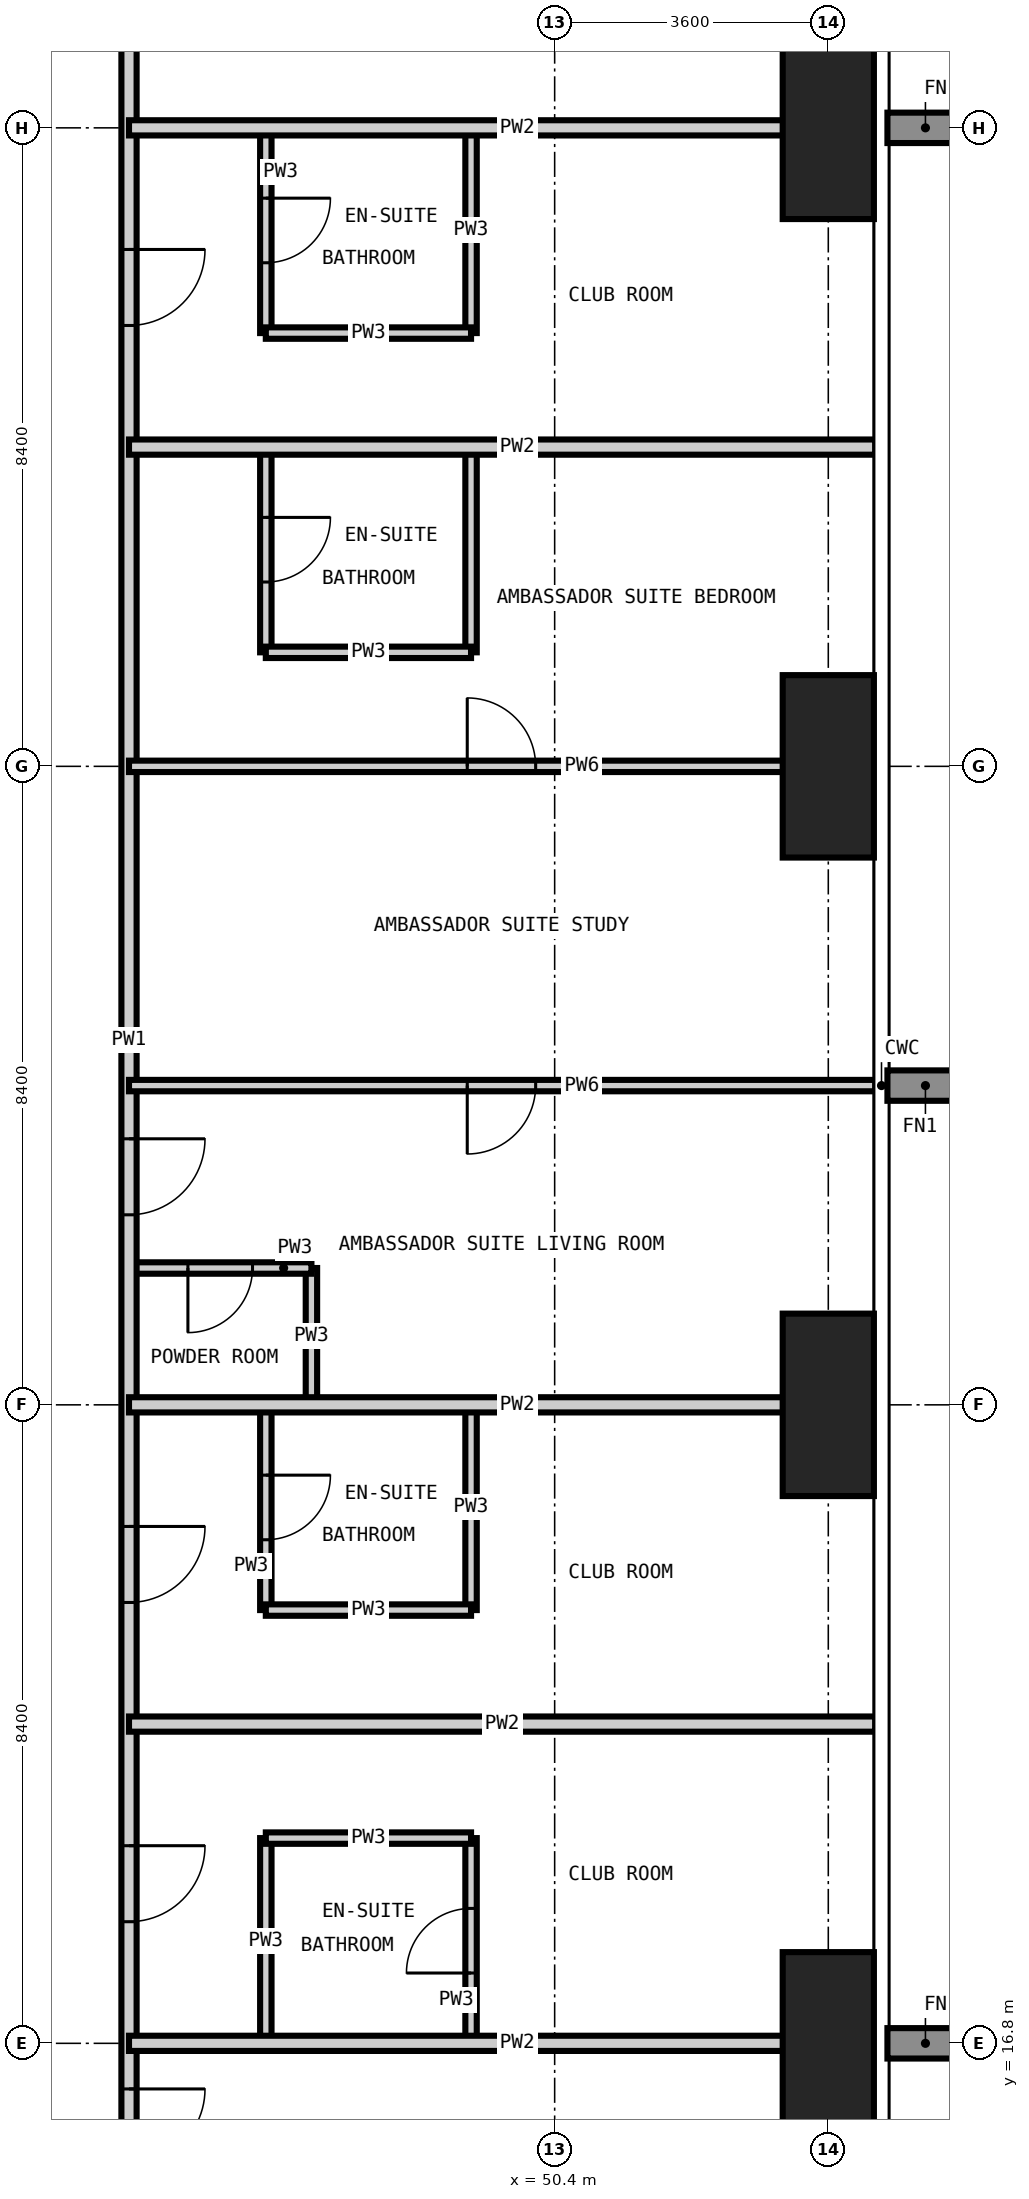
"""IFC4 building model, lengths in metres.
Left out: names, types, materials, properties, quantities, classifications, styles, units other than length and angle.
Written with IfcOpenShell. Run it as: python <this file> out.ifc"""

import sys

from ifc_helpers import new_model, si_unit, direction, frame, frame_2d, origin, origin_2d, place, context, subcontext, project, spatial, rectangle, extrude, element, fill, save


model = new_model("IFC4")
c1 = context("Model", 3, precision=1e-05, world=origin(), true_north=direction((0.0, 1.0)))
c2 = subcontext(c1, "Body", "Model", "MODEL_VIEW")
j1 = project(units=[si_unit("LENGTHUNIT", "METRE"), si_unit("PLANEANGLEUNIT", "RADIAN")], contexts=[c1])
p1 = place(None, origin())
s1 = spatial("IfcSite", under=j1, at=p1, CompositionType="ELEMENT")
p2 = place(p1, origin())
s2 = spatial("IfcBuilding", under=s1, at=p2, CompositionType="ELEMENT")
p3 = place(p2, frame((0.0, 0.0, 205.8)))
s3 = spatial("IfcBuildingStorey", under=s2, at=p3, CompositionType="ELEMENT", Elevation=205.8)
for number, where, z_axis, x_axis in (
    (1, (54.0, 16.8, -0.35), (0.0, 0.0, 1.0), (1.0, 0.0, 0.0)),
    (2, (54.0, 25.2, -0.35), (0.0, 0.0, 1.0), (1.0, 0.0, 0.0)),
    (3, (54.0, 33.6, -0.35), (0.0, 0.0, 1.0), (1.0, 0.0, 0.0)),
    (4, (54.0, 42.0, -0.35), (0.0, 0.0, 1.0), (1.0, 0.0, 0.0)),
):
    element("IfcColumn", number, at=place(p3, frame(where, z_axis=z_axis, x_axis=x_axis)), inside=s3, PredefinedType="COLUMN", context=c2, shape_type="SweptSolid", body=[
        extrude(rectangle(XDim=1.2, YDim=2.4, at=origin_2d()), origin(), (0.0, 0.0, 1.0), 3.6),
    ])
p4 = place(p3, frame((46.6, 16.8, 0.0), z_axis=(0.0, 0.0, 1.0), x_axis=(0.0, 1.0, 0.0)))
e5 = element("IfcWall", 5, at=p4, inside=s3, PredefinedType="PARTITIONING", context=c2, shape_type="SweptSolid", body=[
    extrude(rectangle(XDim=2.7, YDim=0.15, at=frame_2d((1.35, 0.0))), origin(), (0.0, 0.0, 1.0), 3.25),
])
p5 = place(p3, frame((46.6, 22.5, 0.0), z_axis=(0.0, 0.0, 1.0), x_axis=(0.0, 1.0, 0.0)))
e6 = element("IfcWall", 6, at=p5, inside=s3, PredefinedType="PARTITIONING", context=c2, shape_type="SweptSolid", body=[
    extrude(rectangle(XDim=2.7, YDim=0.15, at=frame_2d((1.35, 0.0))), origin(), (0.0, 0.0, 1.0), 3.25),
])
p6 = place(p5, frame((0.925, 0.0, 0.0)))
e7 = element("IfcOpeningElement", 7, at=p6, cuts=e6, PredefinedType="OPENING", context=c2, shape_type="SweptSolid", body=[
    extrude(rectangle(XDim=0.85, YDim=2.1, at=frame_2d((0.425, 1.05))), frame((0.0, 0.085, 0.0), z_axis=(0.0, -1.0, 0.0), x_axis=(1.0, 0.0, 0.0)), (0.0, 0.0, 1.0), 0.17),
])
p7 = place(p3, frame((46.6, 35.1, 0.0), z_axis=(0.0, 0.0, 1.0), x_axis=(0.0, 1.0, 0.0)))
e8 = element("IfcWall", 8, at=p7, inside=s3, PredefinedType="PARTITIONING", context=c2, shape_type="SweptSolid", body=[
    extrude(rectangle(XDim=2.7, YDim=0.15, at=frame_2d((1.35, 0.0))), origin(), (0.0, 0.0, 1.0), 3.25),
])
p8 = place(p7, frame((0.925, 0.0, 0.0)))
e9 = element("IfcOpeningElement", 9, at=p8, cuts=e8, PredefinedType="OPENING", context=c2, shape_type="SweptSolid", body=[
    extrude(rectangle(XDim=0.85, YDim=2.1, at=frame_2d((0.425, 1.05))), frame((0.0, 0.085, 0.0), z_axis=(0.0, -1.0, 0.0), x_axis=(1.0, 0.0, 0.0)), (0.0, 0.0, 1.0), 0.17),
])
p9 = place(p3, frame((46.6, 39.3, 0.0), z_axis=(0.0, 0.0, 1.0), x_axis=(0.0, 1.0, 0.0)))
e10 = element("IfcWall", 10, at=p9, inside=s3, PredefinedType="PARTITIONING", context=c2, shape_type="SweptSolid", body=[
    extrude(rectangle(XDim=2.7, YDim=0.15, at=frame_2d((1.35, 0.0))), origin(), (0.0, 0.0, 1.0), 3.25),
])
p10 = place(p9, frame((0.925, 0.0, 0.0)))
e11 = element("IfcOpeningElement", 11, at=p10, cuts=e10, PredefinedType="OPENING", context=c2, shape_type="SweptSolid", body=[
    extrude(rectangle(XDim=0.85, YDim=2.1, at=frame_2d((0.425, 1.05))), frame((0.0, 0.085, 0.0), z_axis=(0.0, -1.0, 0.0), x_axis=(1.0, 0.0, 0.0)), (0.0, 0.0, 1.0), 0.17),
])
p11 = place(p3, frame((47.2, 25.2, 0.0), z_axis=(0.0, 0.0, 1.0), x_axis=(0.0, 1.0, 0.0)))
e12 = element("IfcWall", 12, at=p11, inside=s3, PredefinedType="PARTITIONING", context=c2, shape_type="SweptSolid", body=[
    extrude(rectangle(XDim=1.8, YDim=0.15, at=frame_2d((0.9, 0.0))), origin(), (0.0, 0.0, 1.0), 3.25),
])
p12 = place(p3, frame((49.3, 16.8, 0.0), z_axis=(0.0, 0.0, 1.0), x_axis=(0.0, 1.0, 0.0)))
e13 = element("IfcWall", 13, at=p12, inside=s3, PredefinedType="PARTITIONING", context=c2, shape_type="SweptSolid", body=[
    extrude(rectangle(XDim=2.7, YDim=0.15, at=frame_2d((1.35, 0.0))), origin(), (0.0, 0.0, 1.0), 3.25),
])
p13 = place(p12, frame((0.925, 0.0, 0.0)))
e14 = element("IfcOpeningElement", 14, at=p13, cuts=e13, PredefinedType="OPENING", context=c2, shape_type="SweptSolid", body=[
    extrude(rectangle(XDim=0.85, YDim=2.1, at=frame_2d((0.425, 1.05))), frame((0.0, 0.085, 0.0), z_axis=(0.0, -1.0, 0.0), x_axis=(1.0, 0.0, 0.0)), (0.0, 0.0, 1.0), 0.17),
])
for number, where, z_axis, x_axis in (
    (15, (49.3, 22.5, 0.0), (0.0, 0.0, 1.0), (0.0, 1.0, 0.0)),
    (16, (49.3, 35.1, 0.0), (0.0, 0.0, 1.0), (0.0, 1.0, 0.0)),
    (17, (49.3, 39.3, 0.0), (0.0, 0.0, 1.0), (0.0, 1.0, 0.0)),
    (18, (46.6, 19.5, 0.0), (0.0, 0.0, 1.0), (1.0, 0.0, 0.0)),
    (19, (46.6, 22.5, 0.0), (0.0, 0.0, 1.0), (1.0, 0.0, 0.0)),
):
    element("IfcWall", number, at=place(p3, frame(where, z_axis=z_axis, x_axis=x_axis)), inside=s3, PredefinedType="PARTITIONING", context=c2, shape_type="SweptSolid", body=[
        extrude(rectangle(XDim=2.7, YDim=0.15, at=frame_2d((1.35, 0.0))), origin(), (0.0, 0.0, 1.0), 3.25),
    ])
p14 = place(p3, frame((44.8, 27.0, 0.0), z_axis=(0.0, 0.0, 1.0), x_axis=(1.0, 0.0, 0.0)))
e20 = element("IfcWall", 20, at=p14, inside=s3, PredefinedType="PARTITIONING", context=c2, shape_type="SweptSolid", body=[
    extrude(rectangle(XDim=2.4, YDim=0.15, at=frame_2d((1.2, 0.0))), origin(), (0.0, 0.0, 1.0), 3.25),
])
p15 = place(p14, frame((0.775, 0.0, 0.0)))
e21 = element("IfcOpeningElement", 21, at=p15, cuts=e20, PredefinedType="OPENING", context=c2, shape_type="SweptSolid", body=[
    extrude(rectangle(XDim=0.85, YDim=2.1, at=frame_2d((0.425, 1.05))), frame((0.0, 0.085, 0.0), z_axis=(0.0, -1.0, 0.0), x_axis=(1.0, 0.0, 0.0)), (0.0, 0.0, 1.0), 0.17),
])
for number, where, z_axis, x_axis in (
    (22, (46.6, 35.1, 0.0), (0.0, 0.0, 1.0), (1.0, 0.0, 0.0)),
    (23, (46.6, 39.3, 0.0), (0.0, 0.0, 1.0), (1.0, 0.0, 0.0)),
):
    element("IfcWall", number, at=place(p3, frame(where, z_axis=z_axis, x_axis=x_axis)), inside=s3, PredefinedType="PARTITIONING", context=c2, shape_type="SweptSolid", body=[
        extrude(rectangle(XDim=2.7, YDim=0.15, at=frame_2d((1.35, 0.0))), origin(), (0.0, 0.0, 1.0), 3.25),
    ])
p16 = place(p3, frame((44.8, 45.4, 0.0), z_axis=(0.0, 0.0, 1.0), x_axis=(0.0, -1.0, 0.0)))
e24 = element("IfcWall", 24, at=p16, inside=s3, PredefinedType="PARTITIONING", context=c2, shape_type="SweptSolid", body=[
    extrude(rectangle(XDim=30.8, YDim=0.2, at=frame_2d((15.4, 0.0))), origin(), (0.0, 0.0, 1.0), 3.25),
])
p17 = place(p16, frame((26.0, 0.0, 0.0)))
e25 = element("IfcOpeningElement", 25, at=p17, cuts=e24, PredefinedType="OPENING", context=c2, shape_type="SweptSolid", body=[
    extrude(rectangle(XDim=1.0, YDim=2.2, at=frame_2d((0.5, 1.1))), frame((0.0, 0.11, 0.0), z_axis=(0.0, -1.0, 0.0), x_axis=(1.0, 0.0, 0.0)), (0.0, 0.0, 1.0), 0.22),
])
p18 = place(p16, frame((21.8, 0.0, 0.0)))
e26 = element("IfcOpeningElement", 26, at=p18, cuts=e24, PredefinedType="OPENING", context=c2, shape_type="SweptSolid", body=[
    extrude(rectangle(XDim=1.0, YDim=2.2, at=frame_2d((0.5, 1.1))), frame((0.0, 0.11, 0.0), z_axis=(0.0, -1.0, 0.0), x_axis=(1.0, 0.0, 0.0)), (0.0, 0.0, 1.0), 0.22),
])
p19 = place(p16, frame((16.7, 0.0, 0.0)))
e27 = element("IfcOpeningElement", 27, at=p19, cuts=e24, PredefinedType="OPENING", context=c2, shape_type="SweptSolid", body=[
    extrude(rectangle(XDim=1.0, YDim=2.2, at=frame_2d((0.5, 1.1))), frame((0.0, 0.11, 0.0), z_axis=(0.0, -1.0, 0.0), x_axis=(1.0, 0.0, 0.0)), (0.0, 0.0, 1.0), 0.22),
])
p20 = place(p16, frame((5.0, 0.0, 0.0)))
e28 = element("IfcOpeningElement", 28, at=p20, cuts=e24, PredefinedType="OPENING", context=c2, shape_type="SweptSolid", body=[
    extrude(rectangle(XDim=1.0, YDim=2.2, at=frame_2d((0.5, 1.1))), frame((0.0, 0.11, 0.0), z_axis=(0.0, -1.0, 0.0), x_axis=(1.0, 0.0, 0.0)), (0.0, 0.0, 1.0), 0.22),
])
p21 = place(p16, frame((29.2, 0.0, 0.0)))
e29 = element("IfcOpeningElement", 29, at=p21, cuts=e24, PredefinedType="OPENING", context=c2, shape_type="SweptSolid", body=[
    extrude(rectangle(XDim=1.0, YDim=2.2, at=frame_2d((0.5, 1.1))), frame((0.0, 0.11, 0.0), z_axis=(0.0, -1.0, 0.0), x_axis=(1.0, 0.0, 0.0)), (0.0, 0.0, 1.0), 0.22),
])
p22 = place(p16, frame((1.2, 0.0, 0.0)))
e30 = element("IfcOpeningElement", 30, at=p22, cuts=e24, PredefinedType="OPENING", context=c2, shape_type="SweptSolid", body=[
    extrude(rectangle(XDim=1.0, YDim=2.2, at=frame_2d((0.5, 1.1))), frame((0.0, 0.11, 0.0), z_axis=(0.0, -1.0, 0.0), x_axis=(1.0, 0.0, 0.0)), (0.0, 0.0, 1.0), 0.22),
])
for number, where, z_axis, x_axis in (
    (31, (44.8, 16.8, 0.0), (0.0, 0.0, 1.0), (1.0, 0.0, 0.0)),
    (32, (44.8, 21.0, 0.0), (0.0, 0.0, 1.0), (1.0, 0.0, 0.0)),
    (33, (44.8, 25.2, 0.0), (0.0, 0.0, 1.0), (1.0, 0.0, 0.0)),
    (34, (44.8, 37.8, 0.0), (0.0, 0.0, 1.0), (1.0, 0.0, 0.0)),
    (35, (44.8, 42.0, 0.0), (0.0, 0.0, 1.0), (1.0, 0.0, 0.0)),
):
    element("IfcWall", number, at=place(p3, frame(where, z_axis=z_axis, x_axis=x_axis)), inside=s3, PredefinedType="PARTITIONING", context=c2, shape_type="SweptSolid", body=[
        extrude(rectangle(XDim=9.818, YDim=0.2, at=frame_2d((4.909, 0.0))), origin(), (0.0, 0.0, 1.0), 3.25),
    ])
p23 = place(p3, frame((44.8, 29.4, 0.0), z_axis=(0.0, 0.0, 1.0), x_axis=(1.0, 0.0, 0.0)))
e36 = element("IfcWall", 36, at=p23, inside=s3, PredefinedType="PARTITIONING", context=c2, shape_type="SweptSolid", body=[
    extrude(rectangle(XDim=9.818, YDim=0.15, at=frame_2d((4.909, 0.0))), origin(), (0.0, 0.0, 1.0), 3.25),
])
p24 = place(p23, frame((4.45, 0.0, 0.0)))
e37 = element("IfcOpeningElement", 37, at=p24, cuts=e36, PredefinedType="OPENING", context=c2, shape_type="SweptSolid", body=[
    extrude(rectangle(XDim=0.9, YDim=2.1, at=frame_2d((0.45, 1.05))), frame((0.0, 0.085, 0.0), z_axis=(0.0, -1.0, 0.0), x_axis=(1.0, 0.0, 0.0)), (0.0, 0.0, 1.0), 0.17),
])
p25 = place(p3, frame((44.8, 33.6, 0.0), z_axis=(0.0, 0.0, 1.0), x_axis=(1.0, 0.0, 0.0)))
e38 = element("IfcWall", 38, at=p25, inside=s3, PredefinedType="PARTITIONING", context=c2, shape_type="SweptSolid", body=[
    extrude(rectangle(XDim=9.818, YDim=0.15, at=frame_2d((4.909, 0.0))), origin(), (0.0, 0.0, 1.0), 3.25),
])
p26 = place(p25, frame((4.45, 0.0, 0.0)))
e39 = element("IfcOpeningElement", 39, at=p26, cuts=e38, PredefinedType="OPENING", context=c2, shape_type="SweptSolid", body=[
    extrude(rectangle(XDim=0.9, YDim=2.1, at=frame_2d((0.45, 1.05))), frame((0.0, 0.085, 0.0), z_axis=(0.0, -1.0, 0.0), x_axis=(1.0, 0.0, 0.0)), (0.0, 0.0, 1.0), 0.17),
])
p27 = place(p17, origin())
e40 = element("IfcDoor", 40, at=p27, inside=s3, OperationType="SINGLE_SWING_LEFT", PredefinedType="DOOR", context=c2, shape_type="SweptSolid", body=[
    extrude(rectangle(XDim=1.0, YDim=2.2, at=frame_2d((0.5, 1.1))), frame((0.0, 0.025, 0.0), z_axis=(0.0, -1.0, 0.0), x_axis=(1.0, 0.0, 0.0)), (0.0, 0.0, 1.0), 0.05),
])
fill(e25, e40)
p28 = place(p13, origin())
e41 = element("IfcDoor", 41, at=p28, inside=s3, OperationType="SINGLE_SWING_LEFT", PredefinedType="DOOR", context=c2, shape_type="SweptSolid", body=[
    extrude(rectangle(XDim=0.85, YDim=2.1, at=frame_2d((0.425, 1.05))), frame((0.0, 0.025, 0.0), z_axis=(0.0, -1.0, 0.0), x_axis=(1.0, 0.0, 0.0)), (0.0, 0.0, 1.0), 0.05),
])
fill(e14, e41)
p29 = place(p18, origin())
e42 = element("IfcDoor", 42, at=p29, inside=s3, OperationType="SINGLE_SWING_LEFT", PredefinedType="DOOR", context=c2, shape_type="SweptSolid", body=[
    extrude(rectangle(XDim=1.0, YDim=2.2, at=frame_2d((0.5, 1.1))), frame((0.0, 0.025, 0.0), z_axis=(0.0, -1.0, 0.0), x_axis=(1.0, 0.0, 0.0)), (0.0, 0.0, 1.0), 0.05),
])
fill(e26, e42)
p30 = place(p6, frame((0.85, 0.0, 0.0), z_axis=(0.0, 0.0, 1.0), x_axis=(-1.0, 0.0, 0.0)))
e43 = element("IfcDoor", 43, at=p30, inside=s3, OperationType="SINGLE_SWING_LEFT", PredefinedType="DOOR", context=c2, shape_type="SweptSolid", body=[
    extrude(rectangle(XDim=0.85, YDim=2.1, at=frame_2d((0.425, 1.05))), frame((0.0, 0.025, 0.0), z_axis=(0.0, -1.0, 0.0), x_axis=(1.0, 0.0, 0.0)), (0.0, 0.0, 1.0), 0.05),
])
fill(e7, e43)
p31 = place(p19, origin())
e44 = element("IfcDoor", 44, at=p31, inside=s3, OperationType="SINGLE_SWING_LEFT", PredefinedType="DOOR", context=c2, shape_type="SweptSolid", body=[
    extrude(rectangle(XDim=1.0, YDim=2.2, at=frame_2d((0.5, 1.1))), frame((0.0, 0.025, 0.0), z_axis=(0.0, -1.0, 0.0), x_axis=(1.0, 0.0, 0.0)), (0.0, 0.0, 1.0), 0.05),
])
fill(e27, e44)
p32 = place(p15, frame((0.85, 0.0, 0.0), z_axis=(0.0, 0.0, 1.0), x_axis=(-1.0, 0.0, 0.0)))
e45 = element("IfcDoor", 45, at=p32, inside=s3, OperationType="SINGLE_SWING_RIGHT", PredefinedType="DOOR", context=c2, shape_type="SweptSolid", body=[
    extrude(rectangle(XDim=0.85, YDim=2.1, at=frame_2d((0.425, 1.05))), frame((0.0, 0.025, 0.0), z_axis=(0.0, -1.0, 0.0), x_axis=(1.0, 0.0, 0.0)), (0.0, 0.0, 1.0), 0.05),
])
fill(e21, e45)
p33 = place(p24, frame((0.9, 0.0, 0.0), z_axis=(0.0, 0.0, 1.0), x_axis=(-1.0, 0.0, 0.0)))
e46 = element("IfcDoor", 46, at=p33, inside=s3, OperationType="SINGLE_SWING_RIGHT", PredefinedType="DOOR", context=c2, shape_type="SweptSolid", body=[
    extrude(rectangle(XDim=0.9, YDim=2.1, at=frame_2d((0.45, 1.05))), frame((0.0, 0.025, 0.0), z_axis=(0.0, -1.0, 0.0), x_axis=(1.0, 0.0, 0.0)), (0.0, 0.0, 1.0), 0.05),
])
fill(e37, e46)
p34 = place(p26, origin())
e47 = element("IfcDoor", 47, at=p34, inside=s3, OperationType="SINGLE_SWING_LEFT", PredefinedType="DOOR", context=c2, shape_type="SweptSolid", body=[
    extrude(rectangle(XDim=0.9, YDim=2.1, at=frame_2d((0.45, 1.05))), frame((0.0, 0.025, 0.0), z_axis=(0.0, -1.0, 0.0), x_axis=(1.0, 0.0, 0.0)), (0.0, 0.0, 1.0), 0.05),
])
fill(e39, e47)
p35 = place(p8, frame((0.85, 0.0, 0.0), z_axis=(0.0, 0.0, 1.0), x_axis=(-1.0, 0.0, 0.0)))
e48 = element("IfcDoor", 48, at=p35, inside=s3, OperationType="SINGLE_SWING_LEFT", PredefinedType="DOOR", context=c2, shape_type="SweptSolid", body=[
    extrude(rectangle(XDim=0.85, YDim=2.1, at=frame_2d((0.425, 1.05))), frame((0.0, 0.025, 0.0), z_axis=(0.0, -1.0, 0.0), x_axis=(1.0, 0.0, 0.0)), (0.0, 0.0, 1.0), 0.05),
])
fill(e9, e48)
p36 = place(p20, origin())
e49 = element("IfcDoor", 49, at=p36, inside=s3, OperationType="SINGLE_SWING_LEFT", PredefinedType="DOOR", context=c2, shape_type="SweptSolid", body=[
    extrude(rectangle(XDim=1.0, YDim=2.2, at=frame_2d((0.5, 1.1))), frame((0.0, 0.025, 0.0), z_axis=(0.0, -1.0, 0.0), x_axis=(1.0, 0.0, 0.0)), (0.0, 0.0, 1.0), 0.05),
])
fill(e28, e49)
p37 = place(p10, frame((0.85, 0.0, 0.0), z_axis=(0.0, 0.0, 1.0), x_axis=(-1.0, 0.0, 0.0)))
e50 = element("IfcDoor", 50, at=p37, inside=s3, OperationType="SINGLE_SWING_LEFT", PredefinedType="DOOR", context=c2, shape_type="SweptSolid", body=[
    extrude(rectangle(XDim=0.85, YDim=2.1, at=frame_2d((0.425, 1.05))), frame((0.0, 0.025, 0.0), z_axis=(0.0, -1.0, 0.0), x_axis=(1.0, 0.0, 0.0)), (0.0, 0.0, 1.0), 0.05),
])
fill(e11, e50)
p38 = place(p21, origin())
e51 = element("IfcDoor", 51, at=p38, inside=s3, OperationType="SINGLE_SWING_LEFT", PredefinedType="DOOR", context=c2, shape_type="SweptSolid", body=[
    extrude(rectangle(XDim=1.0, YDim=2.2, at=frame_2d((0.5, 1.1))), frame((0.0, 0.025, 0.0), z_axis=(0.0, -1.0, 0.0), x_axis=(1.0, 0.0, 0.0)), (0.0, 0.0, 1.0), 0.05),
])
fill(e29, e51)
save(model, sys.argv[1])
